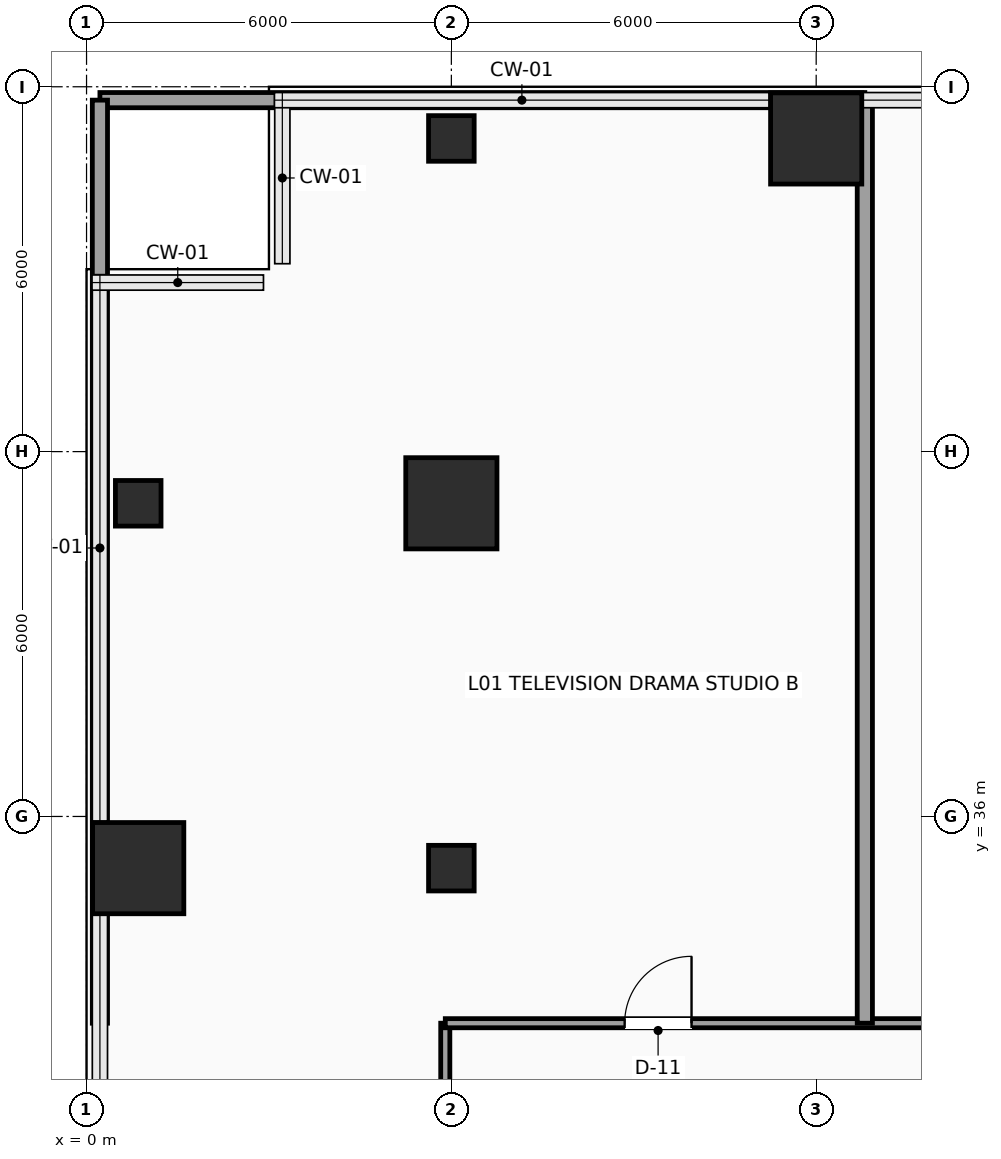
"""IFC4 building model, lengths in metres.
Left out: names, types, materials, properties, quantities, classifications, styles, units other than length and angle.
Written with IfcOpenShell. Run it as: python <this file> out.ifc"""

import sys

from ifc_helpers import new_model, si_unit, direction, frame, frame_2d, origin, origin_2d, place, context, subcontext, project, spatial, rectangle, hollow_rectangle, extrude, element, fill, save


model = new_model("IFC4")
c1 = context("Model", 3, precision=1e-05, world=origin(), true_north=direction((0.0, 1.0)))
c2 = subcontext(c1, "Body", "Model", "MODEL_VIEW")
j1 = project(units=[si_unit("LENGTHUNIT", "METRE"), si_unit("PLANEANGLEUNIT", "RADIAN")], contexts=[c1])
p1 = place(None, origin())
s1 = spatial("IfcSite", under=j1, at=p1, CompositionType="ELEMENT")
p2 = place(p1, origin())
s2 = spatial("IfcBuilding", under=s1, at=p2, CompositionType="ELEMENT")
p3 = place(p2, frame((0.0, 0.0, 5.7)))
s3 = spatial("IfcBuildingStorey", under=s2, at=p3, CompositionType="ELEMENT", Elevation=5.7)
p4 = place(p3, frame((0.85, 35.15, 0.0), z_axis=(0.0, 0.0, 1.0), x_axis=(1.0, 0.0, 0.0)))
e1 = element("IfcColumn", 1, at=p4, inside=s3, PredefinedType="COLUMN", context=c2, shape_type="SweptSolid", body=[
    extrude(rectangle(XDim=1.5, YDim=1.5, at=origin_2d()), origin(), (0.0, 0.0, 1.0), 5.4),
])
for number, where, z_axis, x_axis in (
    (2, (0.85, 41.15, 0.0), (0.0, 0.0, 1.0), (1.0, 0.0, 0.0)),
    (3, (6.0, 35.15, 0.0), (0.0, 0.0, 1.0), (1.0, 0.0, 0.0)),
):
    element("IfcColumn", number, at=place(p3, frame(where, z_axis=z_axis, x_axis=x_axis)), inside=s3, PredefinedType="COLUMN", context=c2, shape_type="SweptSolid", body=[
        extrude(hollow_rectangle(XDim=0.75, YDim=0.75, WallThickness=0.035, InnerFilletRadius=0.035, OuterFilletRadius=0.05, at=origin_2d()), origin(), (0.0, 0.0, 1.0), 5.4),
    ])
p5 = place(p3, frame((6.0, 41.15, 0.0), z_axis=(0.0, 0.0, 1.0), x_axis=(1.0, 0.0, 0.0)))
e4 = element("IfcColumn", 4, at=p5, inside=s3, PredefinedType="COLUMN", context=c2, shape_type="SweptSolid", body=[
    extrude(rectangle(XDim=1.5, YDim=1.5, at=origin_2d()), origin(), (0.0, 0.0, 1.0), 5.4),
])
p6 = place(p3, frame((6.0, 47.15, 0.0), z_axis=(0.0, 0.0, 1.0), x_axis=(1.0, 0.0, 0.0)))
e5 = element("IfcColumn", 5, at=p6, inside=s3, PredefinedType="COLUMN", context=c2, shape_type="SweptSolid", body=[
    extrude(hollow_rectangle(XDim=0.75, YDim=0.75, WallThickness=0.035, InnerFilletRadius=0.035, OuterFilletRadius=0.05, at=origin_2d()), origin(), (0.0, 0.0, 1.0), 5.4),
])
p7 = place(p3, frame((12.0, 47.15, 0.0), z_axis=(0.0, 0.0, 1.0), x_axis=(1.0, 0.0, 0.0)))
e6 = element("IfcColumn", 6, at=p7, inside=s3, PredefinedType="COLUMN", context=c2, shape_type="SweptSolid", body=[
    extrude(rectangle(XDim=1.5, YDim=1.5, at=origin_2d()), origin(), (0.0, 0.0, 1.0), 5.4),
])
p8 = place(p3, frame((5.9, 30.2, 0.0), z_axis=(0.0, 0.0, 1.0), x_axis=(0.0, 1.0, 0.0)))
e7 = element("IfcWall", 7, at=p8, inside=s3, PredefinedType="PARTITIONING", context=c2, shape_type="SweptSolid", body=[
    extrude(rectangle(XDim=2.4, YDim=0.15, at=frame_2d((1.2, 0.0))), origin(), (0.0, 0.0, 1.0), 4.467),
])
p9 = place(p3, frame((5.9, 32.6, 0.0), z_axis=(0.0, 0.0, 1.0), x_axis=(1.0, 0.0, 0.0)))
e8 = element("IfcWall", 8, at=p9, inside=s3, PredefinedType="PARTITIONING", context=c2, shape_type="SweptSolid", body=[
    extrude(rectangle(XDim=14.6, YDim=0.15, at=frame_2d((7.3, 0.0))), origin(), (0.0, 0.0, 1.0), 5.125),
])
p10 = place(p9, frame((2.95, 0.0, 0.0)))
e9 = element("IfcOpeningElement", 9, at=p10, cuts=e8, PredefinedType="OPENING", context=c2, shape_type="SweptSolid", body=[
    extrude(rectangle(XDim=1.1, YDim=2.25, at=frame_2d((0.55, 1.125))), frame((0.0, 0.085, 0.0), z_axis=(0.0, -1.0, 0.0), x_axis=(1.0, 0.0, 0.0)), (0.0, 0.0, 1.0), 0.17),
])
p11 = place(p9, frame((10.275, 0.0, 0.0)))
e10 = element("IfcOpeningElement", 10, at=p11, cuts=e8, PredefinedType="OPENING", context=c2, shape_type="SweptSolid", body=[
    extrude(rectangle(XDim=0.95, YDim=2.15, at=frame_2d((0.475, 1.075))), frame((0.0, 0.085, 0.0), z_axis=(0.0, -1.0, 0.0), x_axis=(1.0, 0.0, 0.0)), (0.0, 0.0, 1.0), 0.17),
])
p12 = place(p3, frame((0.22, 47.78, 0.0), z_axis=(0.0, 0.0, 1.0), x_axis=(1.0, 0.0, 0.0)))
e11 = element("IfcWall", 11, at=p12, inside=s3, PredefinedType="PARTITIONING", context=c2, shape_type="SweptSolid", body=[
    extrude(rectangle(XDim=12.58, YDim=0.25, at=frame_2d((6.29, 0.0))), origin(), (0.0, 0.0, 1.0), 5.125),
])
for number, where, z_axis, x_axis in (
    (12, (0.22, 32.6, 0.0), (0.0, 0.0, 1.0), (0.0, 1.0, 0.0)),
    (13, (12.8, 32.6, 0.0), (0.0, 0.0, 1.0), (0.0, 1.0, 0.0)),
):
    element("IfcWall", number, at=place(p3, frame(where, z_axis=z_axis, x_axis=x_axis)), inside=s3, PredefinedType="PARTITIONING", context=c2, shape_type="SweptSolid", body=[
        extrude(rectangle(XDim=15.18, YDim=0.25, at=frame_2d((7.59, 0.0))), origin(), (0.0, 0.0, 1.0), 5.125),
    ])
p13 = place(p10, origin())
e14 = element("IfcDoor", 14, at=p13, inside=s3, OperationType="SINGLE_SWING_RIGHT", PredefinedType="DOOR", context=c2, shape_type="SweptSolid", body=[
    extrude(rectangle(XDim=1.1, YDim=2.25, at=frame_2d((0.55, 1.125))), frame((0.0, 0.025, 0.0), z_axis=(0.0, -1.0, 0.0), x_axis=(1.0, 0.0, 0.0)), (0.0, 0.0, 1.0), 0.05),
])
fill(e9, e14)
save(model, sys.argv[1])
